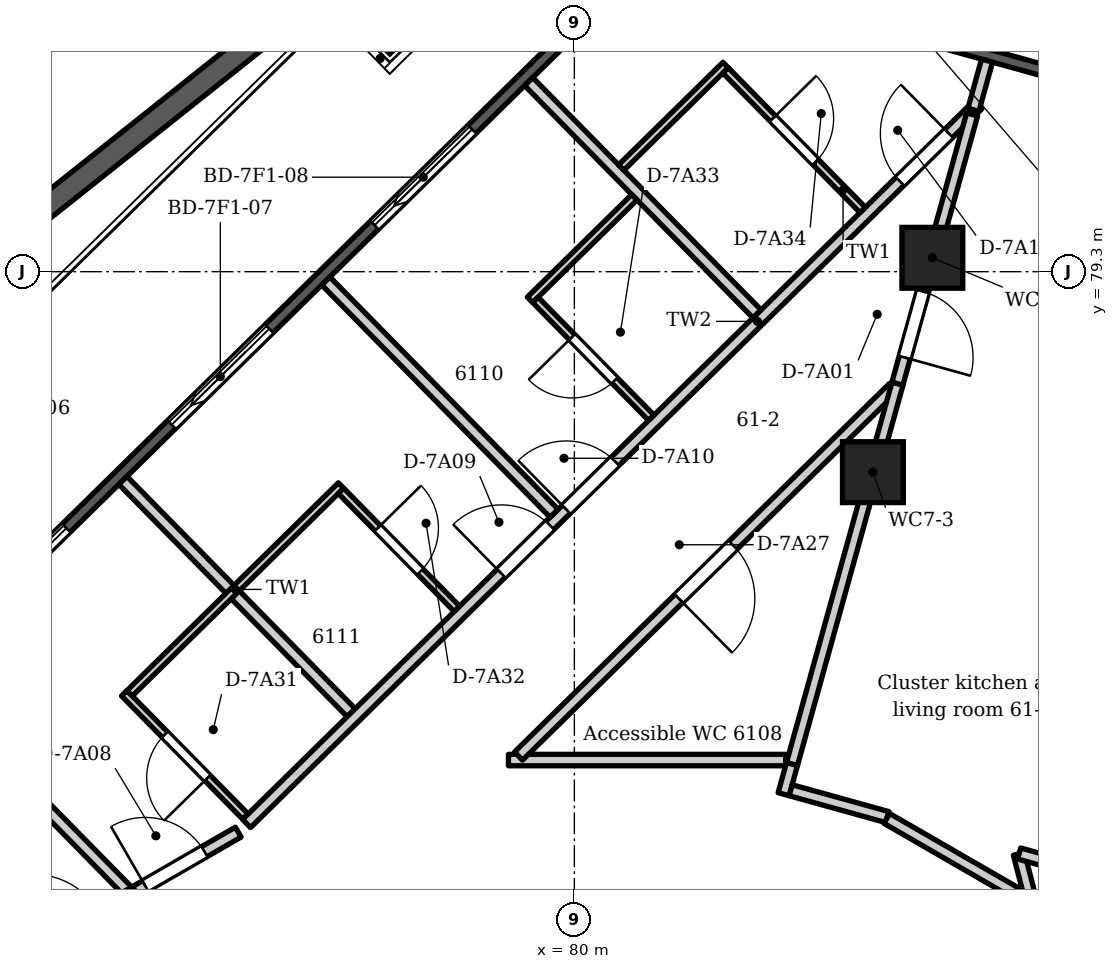
"""IFC4 building model, lengths in metres.
Left out: names, types, materials, properties, quantities, classifications, styles, units other than length and angle.
Written with IfcOpenShell. Run it as: python <this file> out.ifc"""

import sys

from ifc_helpers import new_model, si_unit, direction, frame, frame_2d, origin, origin_2d, place, context, subcontext, project, spatial, polyline, rectangle, circle, outline, extrude, element, fill, save


model = new_model("IFC4")
c1 = context("Model", 3, precision=1e-05, world=origin(), true_north=direction((0.0, 1.0)))
c2 = subcontext(c1, "Body", "Model", "MODEL_VIEW")
j1 = project(units=[si_unit("LENGTHUNIT", "METRE"), si_unit("PLANEANGLEUNIT", "RADIAN")], contexts=[c1])
p1 = place(None, origin())
s1 = spatial("IfcSite", under=j1, at=p1, CompositionType="ELEMENT")
p2 = place(p1, origin())
s2 = spatial("IfcBuilding", under=s1, at=p2, CompositionType="ELEMENT")
p3 = place(p2, frame((0.0, 0.0, 234.9)))
s3 = spatial("IfcBuildingStorey", under=s2, at=p3, CompositionType="ELEMENT", Elevation=234.9)
p4 = place(p3, frame((77.613, 82.625, -0.35), z_axis=(0.0, 0.0, 1.0), x_axis=(0.713250449154, 0.7009092643, 0.0)))
e1 = element("IfcColumn", 1, at=p4, inside=s3, PredefinedType="COLUMN", context=c2, shape_type="SweptSolid", body=[
    extrude(rectangle(XDim=0.7, YDim=0.6, at=origin_2d()), origin(), (0.0, 0.0, 1.0), 3.95),
])
for number, where, z_axis, x_axis in (
    (2, (83.928, 76.663, -0.35), (0.0, 0.0, 1.0), (1.0, 0.0, 0.0)),
    (3, (84.71, 79.483, -0.35), (0.0, 0.0, 1.0), (1.0, 0.0, 0.0)),
):
    element("IfcColumn", number, at=place(p3, frame(where, z_axis=z_axis, x_axis=x_axis)), inside=s3, PredefinedType="COLUMN", context=c2, shape_type="SweptSolid", body=[
        extrude(circle(Radius=0.4, at=origin_2d()), origin(), (0.0, 0.0, 1.0), 3.95),
    ])
p5 = place(p3, frame((57.99, 60.867, 0.0), z_axis=(0.0, 0.0, 1.0), x_axis=(0.713254682671, 0.700904956216, 0.0)))
e4 = element("IfcWall", 4, at=p5, inside=s3, PredefinedType="SOLIDWALL", context=c2, shape_type="SweptSolid", body=[
    extrude(outline(polyline([(0.149, 0.075), (0.149, -0.075), (33.537, -0.075), (33.537, 0.075), (0.149, 0.075)])), origin(), (0.0, 0.0, 1.0), 3.3),
])
p6 = place(p5, frame((1.171, 0.0, 0.0)))
e5 = element("IfcOpeningElement", 5, at=p6, cuts=e4, PredefinedType="OPENING", context=c2, shape_type="SweptSolid", body=[
    extrude(rectangle(XDim=1.8, YDim=2.6, at=frame_2d((0.9, 1.3))), frame((0.0, 0.085, 0.0), z_axis=(0.0, -1.0, 0.0), x_axis=(1.0, 0.0, 0.0)), (0.0, 0.0, 1.0), 0.17),
])
p7 = place(p5, frame((4.714, 0.0, 0.0)))
e6 = element("IfcOpeningElement", 6, at=p7, cuts=e4, PredefinedType="OPENING", context=c2, shape_type="SweptSolid", body=[
    extrude(rectangle(XDim=1.8, YDim=2.6, at=frame_2d((0.9, 1.3))), frame((0.0, 0.085, 0.0), z_axis=(0.0, -1.0, 0.0), x_axis=(1.0, 0.0, 0.0)), (0.0, 0.0, 1.0), 0.17),
])
p8 = place(p5, frame((8.457, 0.0, 0.0)))
e7 = element("IfcOpeningElement", 7, at=p8, cuts=e4, PredefinedType="OPENING", context=c2, shape_type="SweptSolid", body=[
    extrude(rectangle(XDim=1.8, YDim=2.6, at=frame_2d((0.9, 1.3))), frame((0.0, 0.085, 0.0), z_axis=(0.0, -1.0, 0.0), x_axis=(1.0, 0.0, 0.0)), (0.0, 0.0, 1.0), 0.17),
])
p9 = place(p5, frame((12.2, 0.0, 0.0)))
e8 = element("IfcOpeningElement", 8, at=p9, cuts=e4, PredefinedType="OPENING", context=c2, shape_type="SweptSolid", body=[
    extrude(rectangle(XDim=1.8, YDim=2.6, at=frame_2d((0.9, 1.3))), frame((0.0, 0.085, 0.0), z_axis=(0.0, -1.0, 0.0), x_axis=(1.0, 0.0, 0.0)), (0.0, 0.0, 1.0), 0.17),
])
p10 = place(p5, frame((15.943, 0.0, 0.0)))
e9 = element("IfcOpeningElement", 9, at=p10, cuts=e4, PredefinedType="OPENING", context=c2, shape_type="SweptSolid", body=[
    extrude(rectangle(XDim=1.8, YDim=2.6, at=frame_2d((0.9, 1.3))), frame((0.0, 0.085, 0.0), z_axis=(0.0, -1.0, 0.0), x_axis=(1.0, 0.0, 0.0)), (0.0, 0.0, 1.0), 0.17),
])
p11 = place(p5, frame((19.686, 0.0, 0.0)))
e10 = element("IfcOpeningElement", 10, at=p11, cuts=e4, PredefinedType="OPENING", context=c2, shape_type="SweptSolid", body=[
    extrude(rectangle(XDim=1.8, YDim=2.6, at=frame_2d((0.9, 1.3))), frame((0.0, 0.085, 0.0), z_axis=(0.0, -1.0, 0.0), x_axis=(1.0, 0.0, 0.0)), (0.0, 0.0, 1.0), 0.17),
])
p12 = place(p5, frame((23.429, 0.0, 0.0)))
e11 = element("IfcOpeningElement", 11, at=p12, cuts=e4, PredefinedType="OPENING", context=c2, shape_type="SweptSolid", body=[
    extrude(rectangle(XDim=1.8, YDim=2.6, at=frame_2d((0.9, 1.3))), frame((0.0, 0.085, 0.0), z_axis=(0.0, -1.0, 0.0), x_axis=(1.0, 0.0, 0.0)), (0.0, 0.0, 1.0), 0.17),
])
p13 = place(p5, frame((27.172, 0.0, 0.0)))
e12 = element("IfcOpeningElement", 12, at=p13, cuts=e4, PredefinedType="OPENING", context=c2, shape_type="SweptSolid", body=[
    extrude(rectangle(XDim=1.8, YDim=2.6, at=frame_2d((0.9, 1.3))), frame((0.0, 0.085, 0.0), z_axis=(0.0, -1.0, 0.0), x_axis=(1.0, 0.0, 0.0)), (0.0, 0.0, 1.0), 0.17),
])
p14 = place(p5, frame((30.715, 0.0, 0.0)))
e13 = element("IfcOpeningElement", 13, at=p14, cuts=e4, PredefinedType="OPENING", context=c2, shape_type="SweptSolid", body=[
    extrude(rectangle(XDim=1.8, YDim=2.6, at=frame_2d((0.9, 1.3))), frame((0.0, 0.085, 0.0), z_axis=(0.0, -1.0, 0.0), x_axis=(1.0, 0.0, 0.0)), (0.0, 0.0, 1.0), 0.17),
])
p15 = place(p3, frame((84.603, 82.384, 0.0), z_axis=(0.0, 0.0, 1.0), x_axis=(0.963649164221, -0.267170897174, 0.0)))
e14 = element("IfcWall", 14, at=p15, inside=s3, PredefinedType="SOLIDWALL", context=c2, shape_type="SweptSolid", body=[
    extrude(outline(polyline([(0.0, -0.075), (1.757, -0.075), (1.757, 0.075), (0.0, 0.075), (0.0, -0.075)])), origin(), (0.0, 0.0, 1.0), 3.3),
])
p16 = place(p3, origin())
e15 = element("IfcWall", 15, at=p16, inside=s3, PredefinedType="PARAPET", context=c2, shape_type="SweptSolid", body=[
    extrude(outline(polyline([(80.313, 86.12), (49.243, 61.406), (49.565, 61.279), (78.266, 84.108), (80.313, 86.12)])), origin(), (0.0, 0.0, 1.0), 1.1),
])
p17 = place(p3, frame((71.39, 73.931, 0.0), z_axis=(0.0, 0.0, 1.0), x_axis=(0.700963396894, -0.713197249164, 0.0)))
e16 = element("IfcWall", 16, at=p17, inside=s3, PredefinedType="PARTITIONING", context=c2, shape_type="SweptSolid", body=[
    extrude(rectangle(XDim=4.031, YDim=0.15, at=frame_2d((2.016, 0.0))), origin(), (0.0, 0.0, 1.0), 3.3),
])
p18 = place(p3, frame((74.06, 76.554, 0.0), z_axis=(0.0, 0.0, 1.0), x_axis=(0.70095501421, -0.713205487958, 0.0)))
e17 = element("IfcWall", 17, at=p18, inside=s3, PredefinedType="PARTITIONING", context=c2, shape_type="SweptSolid", body=[
    extrude(rectangle(XDim=4.285, YDim=0.15, at=frame_2d((2.142, 0.0))), origin(), (0.0, 0.0, 1.0), 3.3),
])
p19 = place(p3, frame((74.078, 73.754, 0.0), z_axis=(0.0, 0.0, 1.0), x_axis=(0.701016248593, -0.713145300207, 0.0)))
e18 = element("IfcWall", 18, at=p19, inside=s3, PredefinedType="PARTITIONING", context=c2, shape_type="SweptSolid", body=[
    extrude(rectangle(XDim=2.274, YDim=0.1, at=frame_2d((1.137, 0.0))), origin(), (0.0, 0.0, 1.0), 3.3),
])
p20 = place(p19, frame((0.762, 0.0, 0.0)))
e19 = element("IfcOpeningElement", 19, at=p20, cuts=e18, PredefinedType="OPENING", context=c2, shape_type="SweptSolid", body=[
    extrude(rectangle(XDim=0.8, YDim=2.1, at=frame_2d((0.4, 1.05))), frame((0.0, 0.06, 0.0), z_axis=(0.0, -1.0, 0.0), x_axis=(1.0, 0.0, 0.0)), (0.0, 0.0, 1.0), 0.12),
])
p21 = place(p3, frame((74.149, 73.753, 0.0), z_axis=(0.0, 0.0, 1.0), x_axis=(0.713214004819, 0.700946348396, 0.0)))
e20 = element("IfcWall", 20, at=p21, inside=s3, PredefinedType="PARTITIONING", context=c2, shape_type="SweptSolid", body=[
    extrude(rectangle(XDim=3.901, YDim=0.1, at=frame_2d((1.95, 0.0))), origin(), (0.0, 0.0, 1.0), 3.3),
])
p22 = place(p3, frame((74.224, 71.146, 0.0), z_axis=(0.0, 0.0, 1.0), x_axis=(0.866052944554, 0.499952294954, 0.0)))
e21 = element("IfcWall", 21, at=p22, inside=s3, PredefinedType="PARTITIONING", context=c2, shape_type="SweptSolid", body=[
    extrude(rectangle(XDim=1.563, YDim=0.15, at=frame_2d((0.782, 0.0))), origin(), (0.0, 0.0, 1.0), 3.3),
])
p23 = place(p22, frame((0.15, 0.0, 0.0)))
e22 = element("IfcOpeningElement", 22, at=p23, cuts=e21, PredefinedType="OPENING", context=c2, shape_type="SweptSolid", body=[
    extrude(rectangle(XDim=0.9, YDim=2.1, at=frame_2d((0.45, 1.05))), frame((0.0, 0.085, 0.0), z_axis=(0.0, -1.0, 0.0), x_axis=(1.0, 0.0, 0.0)), (0.0, 0.0, 1.0), 0.17),
])
p24 = place(p3, frame((75.687, 72.04, 0.0), z_axis=(0.0, 0.0, 1.0), x_axis=(0.713216712947, 0.700943592861, 0.0)))
e23 = element("IfcWall", 23, at=p24, inside=s3, PredefinedType="PARTITIONING", context=c2, shape_type="SweptSolid", body=[
    extrude(rectangle(XDim=13.487, YDim=0.15, at=frame_2d((6.744, 0.0))), origin(), (0.0, 0.0, 1.0), 2.75),
])
p25 = place(p24, frame((4.697, 0.0, 0.0)))
e24 = element("IfcOpeningElement", 24, at=p25, cuts=e23, PredefinedType="OPENING", context=c2, shape_type="SweptSolid", body=[
    extrude(rectangle(XDim=0.9, YDim=2.1, at=frame_2d((0.45, 1.05))), frame((0.0, 0.085, 0.0), z_axis=(0.0, -1.0, 0.0), x_axis=(1.0, 0.0, 0.0)), (0.0, 0.0, 1.0), 0.17),
])
p26 = place(p24, frame((5.897, 0.0, 0.0)))
e25 = element("IfcOpeningElement", 25, at=p26, cuts=e23, PredefinedType="OPENING", context=c2, shape_type="SweptSolid", body=[
    extrude(rectangle(XDim=0.9, YDim=2.1, at=frame_2d((0.45, 1.05))), frame((0.0, 0.085, 0.0), z_axis=(0.0, -1.0, 0.0), x_axis=(1.0, 0.0, 0.0)), (0.0, 0.0, 1.0), 0.17),
])
p27 = place(p24, frame((12.053, 0.0, 0.0)))
e26 = element("IfcOpeningElement", 26, at=p27, cuts=e23, PredefinedType="OPENING", context=c2, shape_type="SweptSolid", body=[
    extrude(rectangle(XDim=0.9, YDim=2.1, at=frame_2d((0.45, 1.05))), frame((0.0, 0.085, 0.0), z_axis=(0.0, -1.0, 0.0), x_axis=(1.0, 0.0, 0.0)), (0.0, 0.0, 1.0), 0.17),
])
p28 = place(p3, frame((76.73, 79.177, 0.0), z_axis=(0.0, 0.0, 1.0), x_axis=(0.70095501421, -0.713205487958, 0.0)))
e27 = element("IfcWall", 27, at=p28, inside=s3, PredefinedType="PARTITIONING", context=c2, shape_type="SweptSolid", body=[
    extrude(rectangle(XDim=4.285, YDim=0.15, at=frame_2d((2.142, 0.0))), origin(), (0.0, 0.0, 1.0), 3.3),
])
p29 = place(p3, frame((76.93, 76.416, 0.0), z_axis=(0.0, 0.0, 1.0), x_axis=(0.700793702446, -0.713363993073, 0.0)))
e28 = element("IfcWall", 28, at=p29, inside=s3, PredefinedType="PARTITIONING", context=c2, shape_type="SweptSolid", body=[
    extrude(rectangle(XDim=2.175, YDim=0.1, at=frame_2d((1.088, 0.0))), origin(), (0.0, 0.0, 1.0), 3.3),
])
p30 = place(p29, frame((0.688, 0.0, 0.0)))
e29 = element("IfcOpeningElement", 29, at=p30, cuts=e28, PredefinedType="OPENING", context=c2, shape_type="SweptSolid", body=[
    extrude(rectangle(XDim=0.8, YDim=2.1, at=frame_2d((0.4, 1.05))), frame((0.0, 0.06, 0.0), z_axis=(0.0, -1.0, 0.0), x_axis=(1.0, 0.0, 0.0)), (0.0, 0.0, 1.0), 0.12),
])
p31 = place(p3, frame((79.133, 72.875, 0.0), z_axis=(0.0, 0.0, 1.0), x_axis=(1.0, 0.0, 0.0)))
e30 = element("IfcWall", 30, at=p31, inside=s3, PredefinedType="PARTITIONING", context=c2, shape_type="SweptSolid", body=[
    extrude(rectangle(XDim=3.647, YDim=0.15, at=frame_2d((1.823, 0.0))), origin(), (0.0, 0.0, 1.0), 2.8),
])
p32 = place(p3, frame((79.265, 72.927, 0.0), z_axis=(0.0, 0.0, 1.0), x_axis=(0.713171352484, 0.700989744572, 0.0)))
e31 = element("IfcWall", 31, at=p32, inside=s3, PredefinedType="PARTITIONING", context=c2, shape_type="SweptSolid", body=[
    extrude(rectangle(XDim=6.914, YDim=0.15, at=frame_2d((3.457, 0.0))), origin(), (0.0, 0.0, 1.0), 2.8),
])
p33 = place(p32, frame((2.957, 0.0, 0.0)))
e32 = element("IfcOpeningElement", 32, at=p33, cuts=e31, PredefinedType="OPENING", context=c2, shape_type="SweptSolid", body=[
    extrude(rectangle(XDim=1.0, YDim=2.1, at=frame_2d((0.5, 1.05))), frame((0.0, 0.085, 0.0), z_axis=(0.0, -1.0, 0.0), x_axis=(1.0, 0.0, 0.0)), (0.0, 0.0, 1.0), 0.17),
])
p34 = place(p3, frame((79.399, 81.802, 0.0), z_axis=(0.0, 0.0, 1.0), x_axis=(0.70095501421, -0.713205487958, 0.0)))
e33 = element("IfcWall", 33, at=p34, inside=s3, PredefinedType="PARTITIONING", context=c2, shape_type="SweptSolid", body=[
    extrude(rectangle(XDim=4.285, YDim=0.15, at=frame_2d((2.142, 0.0))), origin(), (0.0, 0.0, 1.0), 3.3),
])
p35 = place(p3, frame((79.416, 78.93, 0.0), z_axis=(0.0, 0.0, 1.0), x_axis=(0.713293055377, 0.700865905257, 0.0)))
e34 = element("IfcWall", 34, at=p35, inside=s3, PredefinedType="PARTITIONING", context=c2, shape_type="SweptSolid", body=[
    extrude(rectangle(XDim=1.925, YDim=0.1, at=frame_2d((0.963, 0.0))), origin(), (0.0, 0.0, 1.0), 3.3),
])
p36 = place(p3, frame((79.487, 78.929, 0.0), z_axis=(0.0, 0.0, 1.0), x_axis=(0.701018173636, -0.713143407901, 0.0)))
e35 = element("IfcWall", 35, at=p36, inside=s3, PredefinedType="PARTITIONING", context=c2, shape_type="SweptSolid", body=[
    extrude(rectangle(XDim=2.175, YDim=0.1, at=frame_2d((1.087, 0.0))), origin(), (0.0, 0.0, 1.0), 3.3),
])
p37 = place(p36, frame((0.687, 0.0, 0.0)))
e36 = element("IfcOpeningElement", 36, at=p37, cuts=e35, PredefinedType="OPENING", context=c2, shape_type="SweptSolid", body=[
    extrude(rectangle(XDim=0.8, YDim=2.1, at=frame_2d((0.4, 1.05))), frame((0.0, 0.06, 0.0), z_axis=(0.0, -1.0, 0.0), x_axis=(1.0, 0.0, 0.0)), (0.0, 0.0, 1.0), 0.12),
])
p38 = place(p3, frame((80.616, 80.67, 0.0), z_axis=(0.0, 0.0, 1.0), x_axis=(0.713293055377, 0.700865905257, 0.0)))
e37 = element("IfcWall", 37, at=p38, inside=s3, PredefinedType="PARTITIONING", context=c2, shape_type="SweptSolid", body=[
    extrude(rectangle(XDim=1.925, YDim=0.1, at=frame_2d((0.963, 0.0))), origin(), (0.0, 0.0, 1.0), 3.3),
])
p39 = place(p3, frame((81.989, 81.948, 0.0), z_axis=(0.0, 0.0, 1.0), x_axis=(0.700820910795, -0.713337263146, 0.0)))
e38 = element("IfcWall", 38, at=p39, inside=s3, PredefinedType="PARTITIONING", context=c2, shape_type="SweptSolid", body=[
    extrude(rectangle(XDim=2.575, YDim=0.1, at=frame_2d((1.287, 0.0))), origin(), (0.0, 0.0, 1.0), 3.3),
])
p40 = place(p39, frame((0.887, 0.0, 0.0)))
e39 = element("IfcOpeningElement", 39, at=p40, cuts=e38, PredefinedType="OPENING", context=c2, shape_type="SweptSolid", body=[
    extrude(rectangle(XDim=0.8, YDim=2.1, at=frame_2d((0.4, 1.05))), frame((0.0, 0.06, 0.0), z_axis=(0.0, -1.0, 0.0), x_axis=(1.0, 0.0, 0.0)), (0.0, 0.0, 1.0), 0.12),
])
p41 = place(p3, frame((82.753, 72.426, 0.0), z_axis=(0.0, 0.0, 1.0), x_axis=(0.266887464326, 0.96372770085, 0.0)))
e40 = element("IfcWall", 40, at=p41, inside=s3, PredefinedType="PARTITIONING", context=c2, shape_type="SweptSolid", body=[
    extrude(rectangle(XDim=0.416, YDim=0.15, at=frame_2d((0.208, 0.0))), origin(), (0.0, 0.0, 1.0), 2.8),
])
p42 = place(p3, frame((82.845, 72.478, 0.0), z_axis=(0.0, 0.0, 1.0), x_axis=(0.963623826389, -0.267262270467, 0.0)))
e41 = element("IfcWall", 41, at=p42, inside=s3, PredefinedType="PARTITIONING", context=c2, shape_type="SweptSolid", body=[
    extrude(rectangle(XDim=1.32, YDim=0.15, at=frame_2d((0.66, 0.0))), origin(), (0.0, 0.0, 1.0), 2.8),
])
p43 = place(p3, frame((82.863, 72.823, 0.0), z_axis=(0.0, 0.0, 1.0), x_axis=(0.267297315726, 0.963614105857, 0.0)))
e42 = element("IfcWall", 42, at=p43, inside=s3, PredefinedType="PARTITIONING", context=c2, shape_type="SweptSolid", body=[
    extrude(rectangle(XDim=5.196, YDim=0.15, at=frame_2d((2.598, 0.0))), origin(), (0.0, 0.0, 1.0), 2.8),
])
p44 = place(p3, frame((84.11, 72.107, 0.0), z_axis=(0.0, 0.0, 1.0), x_axis=(0.865965412825, -0.500103892997, 0.0)))
e43 = element("IfcWall", 43, at=p44, inside=s3, PredefinedType="PARTITIONING", context=c2, shape_type="SweptSolid", body=[
    extrude(rectangle(XDim=2.271, YDim=0.15, at=frame_2d((1.136, 0.0))), origin(), (0.0, 0.0, 1.0), 3.3),
])
p45 = place(p3, frame((84.25, 77.827, 0.0), z_axis=(0.0, 0.0, 1.0), x_axis=(0.267414329718, 0.963581639645, 0.0)))
e44 = element("IfcWall", 44, at=p45, inside=s3, PredefinedType="PARTITIONING", context=c2, shape_type="SweptSolid", body=[
    extrude(rectangle(XDim=3.676, YDim=0.15, at=frame_2d((1.838, 0.0))), origin(), (0.0, 0.0, 1.0), 2.75),
])
p46 = place(p45, frame((0.357, 0.0, 0.0)))
e45 = element("IfcOpeningElement", 45, at=p46, cuts=e44, PredefinedType="OPENING", context=c2, shape_type="SweptSolid", body=[
    extrude(rectangle(XDim=0.9, YDim=2.1, at=frame_2d((0.45, 1.05))), frame((0.0, 0.085, 0.0), z_axis=(0.0, -1.0, 0.0), x_axis=(1.0, 0.0, 0.0)), (0.0, 0.0, 1.0), 0.17),
])
p47 = place(p3, frame((85.25, 81.43, 0.0), z_axis=(0.0, 0.0, 1.0), x_axis=(0.267118275652, 0.963663751945, 0.0)))
e46 = element("IfcWall", 46, at=p47, inside=s3, PredefinedType="PARTITIONING", context=c2, shape_type="SweptSolid", body=[
    extrude(rectangle(XDim=0.671, YDim=0.15, at=frame_2d((0.335, 0.0))), origin(), (0.0, 0.0, 1.0), 3.3),
])
p48 = place(p3, frame((85.848, 71.642, 0.0), z_axis=(0.0, 0.0, 1.0), x_axis=(0.250859734684, -0.968023446779, 0.0)))
e47 = element("IfcWall", 47, at=p48, inside=s3, PredefinedType="PARTITIONING", context=c2, shape_type="SweptSolid", body=[
    extrude(rectangle(XDim=0.579, YDim=0.15, at=frame_2d((0.29, 0.0))), origin(), (0.0, 0.0, 1.0), 3.3),
])
p49 = place(p3, frame((85.852, 71.646, 0.0), z_axis=(0.0, 0.0, 1.0), x_axis=(0.963638385721, -0.267209770713, 0.0)))
e48 = element("IfcWall", 48, at=p49, inside=s3, PredefinedType="PARTITIONING", context=c2, shape_type="SweptSolid", body=[
    extrude(rectangle(XDim=2.089, YDim=0.15, at=frame_2d((1.044, 0.0))), origin(), (0.0, 0.0, 1.0), 3.3),
])
p50 = place(p11, origin())
e49 = element("IfcDoor", 49, at=p50, inside=s3, OperationType="SLIDING_TO_LEFT", PredefinedType="DOOR", context=c2, shape_type="SweptSolid", body=[
    extrude(rectangle(XDim=1.8, YDim=2.6, at=frame_2d((0.9, 1.3))), frame((0.0, 0.025, 0.0), z_axis=(0.0, -1.0, 0.0), x_axis=(1.0, 0.0, 0.0)), (0.0, 0.0, 1.0), 0.05),
])
fill(e10, e49)
p51 = place(p12, origin())
e50 = element("IfcDoor", 50, at=p51, inside=s3, OperationType="SLIDING_TO_LEFT", PredefinedType="DOOR", context=c2, shape_type="SweptSolid", body=[
    extrude(rectangle(XDim=1.8, YDim=2.6, at=frame_2d((0.9, 1.3))), frame((0.0, 0.025, 0.0), z_axis=(0.0, -1.0, 0.0), x_axis=(1.0, 0.0, 0.0)), (0.0, 0.0, 1.0), 0.05),
])
fill(e11, e50)
p52 = place(p13, origin())
e51 = element("IfcDoor", 51, at=p52, inside=s3, OperationType="SLIDING_TO_LEFT", PredefinedType="DOOR", context=c2, shape_type="SweptSolid", body=[
    extrude(rectangle(XDim=1.8, YDim=2.6, at=frame_2d((0.9, 1.3))), frame((0.0, 0.025, 0.0), z_axis=(0.0, -1.0, 0.0), x_axis=(1.0, 0.0, 0.0)), (0.0, 0.0, 1.0), 0.05),
])
fill(e12, e51)
p53 = place(p46, frame((0.9, 0.0, 0.0), z_axis=(0.0, 0.0, 1.0), x_axis=(-1.0, 0.0, 0.0)))
e52 = element("IfcDoor", 52, at=p53, inside=s3, OperationType="SINGLE_SWING_RIGHT", PredefinedType="DOOR", context=c2, shape_type="SweptSolid", body=[
    extrude(rectangle(XDim=0.9, YDim=2.1, at=frame_2d((0.45, 1.05))), frame((0.0, 0.025, 0.0), z_axis=(0.0, -1.0, 0.0), x_axis=(1.0, 0.0, 0.0)), (0.0, 0.0, 1.0), 0.05),
])
fill(e45, e52)
p54 = place(p23, origin())
e53 = element("IfcDoor", 53, at=p54, inside=s3, OperationType="SINGLE_SWING_LEFT", PredefinedType="DOOR", context=c2, shape_type="SweptSolid", body=[
    extrude(rectangle(XDim=0.9, YDim=2.1, at=frame_2d((0.45, 1.05))), frame((0.0, 0.025, 0.0), z_axis=(0.0, -1.0, 0.0), x_axis=(1.0, 0.0, 0.0)), (0.0, 0.0, 1.0), 0.05),
])
fill(e22, e53)
p55 = place(p25, origin())
e54 = element("IfcDoor", 54, at=p55, inside=s3, OperationType="SINGLE_SWING_LEFT", PredefinedType="DOOR", context=c2, shape_type="SweptSolid", body=[
    extrude(rectangle(XDim=0.9, YDim=2.1, at=frame_2d((0.45, 1.05))), frame((0.0, 0.025, 0.0), z_axis=(0.0, -1.0, 0.0), x_axis=(1.0, 0.0, 0.0)), (0.0, 0.0, 1.0), 0.05),
])
fill(e24, e54)
p56 = place(p26, origin())
e55 = element("IfcDoor", 55, at=p56, inside=s3, OperationType="SINGLE_SWING_LEFT", PredefinedType="DOOR", context=c2, shape_type="SweptSolid", body=[
    extrude(rectangle(XDim=0.9, YDim=2.1, at=frame_2d((0.45, 1.05))), frame((0.0, 0.025, 0.0), z_axis=(0.0, -1.0, 0.0), x_axis=(1.0, 0.0, 0.0)), (0.0, 0.0, 1.0), 0.05),
])
fill(e25, e55)
p57 = place(p27, origin())
e56 = element("IfcDoor", 56, at=p57, inside=s3, OperationType="SINGLE_SWING_RIGHT", PredefinedType="DOOR", context=c2, shape_type="SweptSolid", body=[
    extrude(rectangle(XDim=0.9, YDim=2.1, at=frame_2d((0.45, 1.05))), frame((0.0, 0.025, 0.0), z_axis=(0.0, -1.0, 0.0), x_axis=(1.0, 0.0, 0.0)), (0.0, 0.0, 1.0), 0.05),
])
fill(e26, e56)
p58 = place(p33, frame((1.0, 0.0, 0.0), z_axis=(0.0, 0.0, 1.0), x_axis=(-1.0, 0.0, 0.0)))
e57 = element("IfcDoor", 57, at=p58, inside=s3, OperationType="SINGLE_SWING_RIGHT", PredefinedType="DOOR", context=c2, shape_type="SweptSolid", body=[
    extrude(rectangle(XDim=1.0, YDim=2.1, at=frame_2d((0.5, 1.05))), frame((0.0, 0.025, 0.0), z_axis=(0.0, -1.0, 0.0), x_axis=(1.0, 0.0, 0.0)), (0.0, 0.0, 1.0), 0.05),
])
fill(e32, e57)
p59 = place(p20, frame((0.8, 0.0, 0.0), z_axis=(0.0, 0.0, 1.0), x_axis=(-1.0, 0.0, 0.0)))
e58 = element("IfcDoor", 58, at=p59, inside=s3, OperationType="SINGLE_SWING_LEFT", PredefinedType="DOOR", context=c2, shape_type="SweptSolid", body=[
    extrude(rectangle(XDim=0.8, YDim=2.1, at=frame_2d((0.4, 1.05))), frame((0.0, 0.025, 0.0), z_axis=(0.0, -1.0, 0.0), x_axis=(1.0, 0.0, 0.0)), (0.0, 0.0, 1.0), 0.05),
])
fill(e19, e58)
p60 = place(p30, origin())
e59 = element("IfcDoor", 59, at=p60, inside=s3, OperationType="SINGLE_SWING_LEFT", PredefinedType="DOOR", context=c2, shape_type="SweptSolid", body=[
    extrude(rectangle(XDim=0.8, YDim=2.1, at=frame_2d((0.4, 1.05))), frame((0.0, 0.025, 0.0), z_axis=(0.0, -1.0, 0.0), x_axis=(1.0, 0.0, 0.0)), (0.0, 0.0, 1.0), 0.05),
])
fill(e29, e59)
p61 = place(p37, frame((0.8, 0.0, 0.0), z_axis=(0.0, 0.0, 1.0), x_axis=(-1.0, 0.0, 0.0)))
e60 = element("IfcDoor", 60, at=p61, inside=s3, OperationType="SINGLE_SWING_RIGHT", PredefinedType="DOOR", context=c2, shape_type="SweptSolid", body=[
    extrude(rectangle(XDim=0.8, YDim=2.1, at=frame_2d((0.4, 1.05))), frame((0.0, 0.025, 0.0), z_axis=(0.0, -1.0, 0.0), x_axis=(1.0, 0.0, 0.0)), (0.0, 0.0, 1.0), 0.05),
])
fill(e36, e60)
p62 = place(p40, origin())
e61 = element("IfcDoor", 61, at=p62, inside=s3, OperationType="SINGLE_SWING_LEFT", PredefinedType="DOOR", context=c2, shape_type="SweptSolid", body=[
    extrude(rectangle(XDim=0.8, YDim=2.1, at=frame_2d((0.4, 1.05))), frame((0.0, 0.025, 0.0), z_axis=(0.0, -1.0, 0.0), x_axis=(1.0, 0.0, 0.0)), (0.0, 0.0, 1.0), 0.05),
])
fill(e39, e61)
save(model, sys.argv[1])
